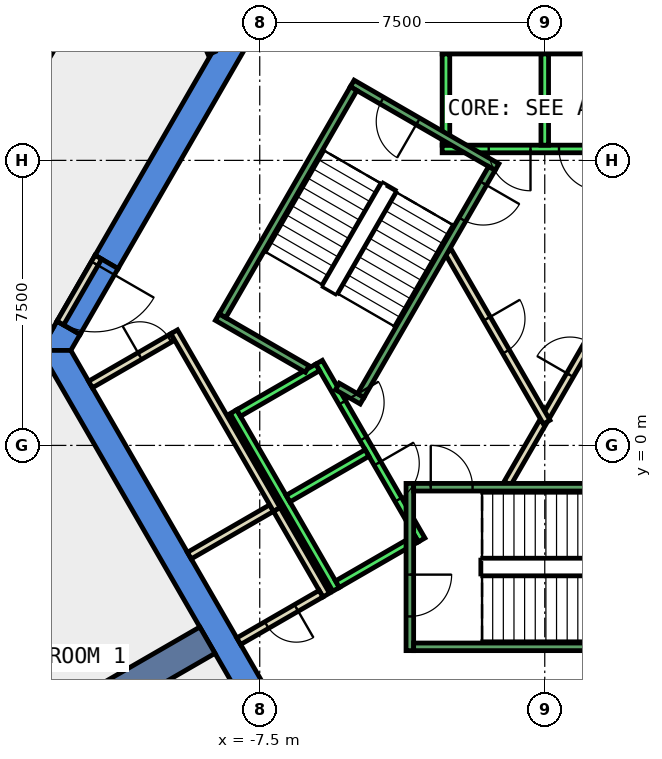
"""IFC4 building model, lengths in metres.
Left out: names, types, materials, properties, quantities, classifications, styles, units other than length and angle.
Written with IfcOpenShell. Run it as: python <this file> out.ifc"""

import sys

from ifc_helpers import new_model, si_unit, direction, frame, frame_2d, origin, place, context, subcontext, project, spatial, polyline, rectangle, outline, extrude, element, fill, save


model = new_model("IFC4")
c1 = context("Model", 3, precision=1e-05, world=origin(), true_north=direction((0.0, 1.0)))
c2 = subcontext(c1, "Body", "Model", "MODEL_VIEW")
j1 = project(units=[si_unit("LENGTHUNIT", "METRE"), si_unit("PLANEANGLEUNIT", "RADIAN")], contexts=[c1])
p1 = place(None, origin())
s1 = spatial("IfcSite", under=j1, at=p1, CompositionType="ELEMENT")
p2 = place(p1, origin())
s2 = spatial("IfcBuilding", under=s1, at=p2, CompositionType="ELEMENT")
p3 = place(p2, frame((0.0, 0.0, 223.4)))
s3 = spatial("IfcBuildingStorey", under=s2, at=p3, CompositionType="ELEMENT", Elevation=223.4)
p4 = place(p3, frame((0.0, 0.0, -0.4)))
e1 = element("IfcWall", 1, at=p4, inside=s3, PredefinedType="SHEAR", context=c2, shape_type="SweptSolid", body=[
    extrude(outline(polyline([(-11.834, 5.002), (-11.228, 4.652), (-6.235, 13.3), (-6.64, 14.0), (-11.834, 5.002)])), origin(), (0.0, 0.0, 1.0), 4.2),
])
p5 = place(p3, frame((0.0, 0.0, -0.4)))
e2 = element("IfcWall", 2, at=p5, inside=s3, PredefinedType="SHEAR", context=c2, shape_type="SweptSolid", body=[
    extrude(outline(polyline([(-12.228, 2.92), (-12.834, 3.27), (-13.279, 2.5), (-12.471, 2.5), (-12.228, 2.92)])), origin(), (0.0, 0.0, 1.0), 4.2),
])
p6 = place(p3, frame((0.0, 0.0, 3.6)))
e3 = element("IfcWall", 3, at=p6, inside=s3, PredefinedType="SHEAR", context=c2, shape_type="SweptSolid", body=[
    extrude(outline(polyline([(-12.834, 3.27), (-12.228, 2.92), (-11.228, 4.652), (-11.834, 5.002), (-12.834, 3.27)])), origin(), (0.0, 0.0, 1.0), 0.2),
])
p7 = place(p3, frame((0.0, 0.0, -0.4)))
e4 = element("IfcWall", 4, at=p7, inside=s3, PredefinedType="SHEAR", context=c2, shape_type="SweptSolid", body=[
    extrude(outline(polyline([(-13.279, 2.5), (-6.64, -9.0), (-6.235, -8.3), (-12.471, 2.5), (-13.279, 2.5)])), origin(), (0.0, 0.0, 1.0), 4.2),
])
p8 = place(p3, frame((-8.877, -5.125, -0.4), z_axis=(0.0, 0.0, 1.0), x_axis=(-0.866017533419, -0.500013631625, 0.0)))
e5 = element("IfcWall", 5, at=p8, inside=s3, PredefinedType="SHEAR", context=c2, shape_type="SweptSolid", body=[
    extrude(rectangle(XDim=9.0, YDim=0.8, at=frame_2d((4.5, 0.0))), origin(), (0.0, 0.0, 1.0), 4.2),
])
p9 = place(p3, frame((-9.624, 12.265, 0.0), z_axis=(0.0, 0.0, 1.0), x_axis=(0.404081180606, -0.914723127225, 0.0)))
e6 = element("IfcWall", 6, at=p9, inside=s3, PredefinedType="PARTITIONING", context=c2, shape_type="SweptSolid", body=[
    extrude(rectangle(XDim=2.126, YDim=0.2, at=frame_2d((1.063, 0.0))), origin(), (0.0, 0.0, 1.0), 3.8),
])
p10 = place(p3, frame((-12.984, 3.01, 0.0), z_axis=(0.0, 0.0, 1.0), x_axis=(-0.866046247233, 0.49996389635, 0.0)))
e7 = element("IfcWall", 7, at=p10, inside=s3, PredefinedType="PARTITIONING", context=c2, shape_type="SweptSolid", body=[
    extrude(rectangle(XDim=0.35, YDim=0.2, at=frame_2d((0.175, 0.0))), origin(), (0.0, 0.0, 1.0), 2.4),
])
p11 = place(p3, frame((-14.236, 8.305, 0.0), z_axis=(0.0, 0.0, 1.0), x_axis=(0.500110539333, 0.865961574464, 0.0)))
e8 = element("IfcWall", 8, at=p11, inside=s3, PredefinedType="PARTITIONING", context=c2, shape_type="SweptSolid", body=[
    extrude(rectangle(XDim=3.993, YDim=0.2, at=frame_2d((1.997, 0.0))), origin(), (0.0, 0.0, 1.0), 3.8),
])
p12 = place(p3, frame((-7.188, -1.65, 0.0), z_axis=(0.0, 0.0, 1.0), x_axis=(-0.866022959057, -0.500004234368, 0.0)))
e9 = element("IfcWall", 9, at=p12, inside=s3, PredefinedType="PARTITIONING", context=c2, shape_type="SweptSolid", body=[
    extrude(rectangle(XDim=2.5, YDim=0.2, at=frame_2d((1.25, 0.0))), origin(), (0.0, 0.0, 1.0), 3.8),
])
p13 = place(p3, frame((-11.953, 1.603, 0.0), z_axis=(0.0, 0.0, 1.0), x_axis=(0.865998541277, 0.500046524342, 0.0)))
e10 = element("IfcWall", 10, at=p13, inside=s3, PredefinedType="PARTITIONING", context=c2, shape_type="SweptSolid", body=[
    extrude(rectangle(XDim=2.5, YDim=0.2, at=frame_2d((1.25, 0.0))), origin(), (0.0, 0.0, 1.0), 3.8),
])
p14 = place(p13, frame((1.5, 0.0, 0.0)))
e11 = element("IfcOpeningElement", 11, at=p14, cuts=e10, PredefinedType="OPENING", context=c2, shape_type="SweptSolid", body=[
    extrude(rectangle(XDim=0.9, YDim=2.1, at=frame_2d((0.45, 1.05))), frame((0.0, 0.11, 0.0), z_axis=(0.0, -1.0, 0.0), x_axis=(1.0, 0.0, 0.0)), (0.0, 0.0, 1.0), 0.22),
])
p15 = place(p3, frame((-9.751, 2.99, 0.0), z_axis=(0.0, 0.0, 1.0), x_axis=(0.499955951776, -0.866050833545, 0.0)))
e12 = element("IfcWall", 12, at=p15, inside=s3, PredefinedType="PARTITIONING", context=c2, shape_type="SweptSolid", body=[
    extrude(rectangle(XDim=5.4, YDim=0.2, at=frame_2d((2.7, 0.0))), origin(), (0.0, 0.0, 1.0), 3.8),
])
p16 = place(p3, frame((-7.051, -1.687, 0.0), z_axis=(0.0, 0.0, 1.0), x_axis=(0.500128937424, -0.865950948929, 0.0)))
e13 = element("IfcWall", 13, at=p16, inside=s3, PredefinedType="PARTITIONING", context=c2, shape_type="SweptSolid", body=[
    extrude(rectangle(XDim=2.599, YDim=0.2, at=frame_2d((1.3, 0.0))), origin(), (0.0, 0.0, 1.0), 3.8),
])
p17 = place(p3, frame((-5.888, -3.902, 0.0), z_axis=(0.0, 0.0, 1.0), x_axis=(-0.866022959057, -0.500004234368, 0.0)))
e14 = element("IfcWall", 14, at=p17, inside=s3, PredefinedType="PARTITIONING", context=c2, shape_type="SweptSolid", body=[
    extrude(rectangle(XDim=2.5, YDim=0.2, at=frame_2d((1.25, 0.0))), origin(), (0.0, 0.0, 1.0), 3.8),
])
p18 = place(p17, frame((0.75, 0.0, 0.0)))
e15 = element("IfcOpeningElement", 15, at=p18, cuts=e14, PredefinedType="OPENING", context=c2, shape_type="SweptSolid", body=[
    extrude(rectangle(XDim=0.9, YDim=2.1, at=frame_2d((0.45, 1.05))), frame((0.0, 0.11, 0.0), z_axis=(0.0, -1.0, 0.0), x_axis=(1.0, 0.0, 0.0)), (0.0, 0.0, 1.0), 0.22),
])
p19 = place(p3, frame((-0.982, -1.0, 0.0), z_axis=(0.0, 0.0, 1.0), x_axis=(0.50024047865, 0.865886518847, 0.0)))
e16 = element("IfcWall", 16, at=p19, inside=s3, PredefinedType="PARTITIONING", context=c2, shape_type="SweptSolid", body=[
    extrude(rectangle(XDim=1.863, YDim=0.2, at=frame_2d((0.931, 0.0))), origin(), (0.0, 0.0, 1.0), 3.8),
])
p20 = place(p3, frame((0.05, 0.787, 0.0), z_axis=(0.0, 0.0, 1.0), x_axis=(0.499954076797, 0.866051915934, 0.0)))
e17 = element("IfcWall", 17, at=p20, inside=s3, PredefinedType="PARTITIONING", context=c2, shape_type="SweptSolid", body=[
    extrude(rectangle(XDim=3.558, YDim=0.2, at=frame_2d((1.779, 0.0))), origin(), (0.0, 0.0, 1.0), 3.8),
])
p21 = place(p20, frame((1.229, 0.0, 0.0)))
e18 = element("IfcOpeningElement", 18, at=p21, cuts=e17, PredefinedType="OPENING", context=c2, shape_type="SweptSolid", body=[
    extrude(rectangle(XDim=1.0, YDim=2.1, at=frame_2d((0.5, 1.05))), frame((0.0, 0.11, 0.0), z_axis=(0.0, -1.0, 0.0), x_axis=(1.0, 0.0, 0.0)), (0.0, 0.0, 1.0), 0.22),
])
p22 = place(p3, frame((-2.54, 5.1, 0.0), z_axis=(0.0, 0.0, 1.0), x_axis=(0.499925051871, -0.866068670783, 0.0)))
e19 = element("IfcWall", 19, at=p22, inside=s3, PredefinedType="PARTITIONING", context=c2, shape_type="SweptSolid", body=[
    extrude(rectangle(XDim=5.181, YDim=0.2, at=frame_2d((2.59, 0.0))), origin(), (0.0, 0.0, 1.0), 3.8),
])
p23 = place(p22, frame((2.04, 0.0, 0.0)))
e20 = element("IfcOpeningElement", 20, at=p23, cuts=e19, PredefinedType="OPENING", context=c2, shape_type="SweptSolid", body=[
    extrude(rectangle(XDim=1.0, YDim=2.1, at=frame_2d((0.5, 1.05))), frame((0.0, 0.11, 0.0), z_axis=(0.0, -1.0, 0.0), x_axis=(1.0, 0.0, 0.0)), (0.0, 0.0, 1.0), 0.22),
])
p24 = place(p3, frame((-11.747, 4.952, 0.0), z_axis=(0.0, 0.0, 1.0), x_axis=(-0.50002537861, -0.866010750942, 0.0)))
e21 = element("IfcWall", 21, at=p24, inside=s3, PredefinedType="PARTITIONING", context=c2, shape_type="SweptSolid", body=[
    extrude(rectangle(XDim=2.0, YDim=0.2, at=frame_2d((1.0, 0.0))), origin(), (0.0, 0.0, 1.0), 2.4),
])
p25 = place(p24, frame((0.19, 0.0, 0.0)))
e22 = element("IfcOpeningElement", 22, at=p25, cuts=e21, PredefinedType="OPENING", context=c2, shape_type="SweptSolid", body=[
    extrude(rectangle(XDim=1.8, YDim=2.1, at=frame_2d((0.9, 1.05))), frame((0.0, 0.11, 0.0), z_axis=(0.0, -1.0, 0.0), x_axis=(1.0, 0.0, 0.0)), (0.0, 0.0, 1.0), 0.22),
])
p26 = place(p3, frame((2.7, 7.8, 0.0), z_axis=(0.0, 0.0, 1.0), x_axis=(-1.0, 0.0, 0.0)))
e23 = element("IfcWall", 23, at=p26, inside=s3, PredefinedType="STANDARD", context=c2, shape_type="SweptSolid", body=[
    extrude(rectangle(XDim=5.4, YDim=0.2, at=frame_2d((2.7, 0.0))), origin(), (0.0, 0.0, 1.0), 3.8),
])
p27 = place(p26, frame((1.225, 0.0, 0.0)))
e24 = element("IfcOpeningElement", 24, at=p27, cuts=e23, PredefinedType="OPENING", context=c2, shape_type="SweptSolid", body=[
    extrude(rectangle(XDim=1.1, YDim=2.1, at=frame_2d((0.55, 1.05))), frame((0.0, 0.11, 0.0), z_axis=(0.0, -1.0, 0.0), x_axis=(1.0, 0.0, 0.0)), (0.0, 0.0, 1.0), 0.22),
])
p28 = place(p26, frame((3.075, 0.0, 0.0)))
e25 = element("IfcOpeningElement", 25, at=p28, cuts=e23, PredefinedType="OPENING", context=c2, shape_type="SweptSolid", body=[
    extrude(rectangle(XDim=1.1, YDim=2.1, at=frame_2d((0.55, 1.05))), frame((0.0, 0.11, 0.0), z_axis=(0.0, -1.0, 0.0), x_axis=(1.0, 0.0, 0.0)), (0.0, 0.0, 1.0), 0.22),
])
p29 = place(p3, frame((2.7, 10.4, 0.0), z_axis=(0.0, 0.0, 1.0), x_axis=(-1.0, 0.0, 0.0)))
e26 = element("IfcWall", 26, at=p29, inside=s3, PredefinedType="STANDARD", context=c2, shape_type="SweptSolid", body=[
    extrude(rectangle(XDim=5.4, YDim=0.2, at=frame_2d((2.7, 0.0))), origin(), (0.0, 0.0, 1.0), 3.8),
])
for number, where, z_axis, x_axis in (
    (27, (0.0, 7.9, 0.0), (0.0, 0.0, 1.0), (0.0, 1.0, 0.0)),
    (28, (-2.6, 7.9, 0.0), (0.0, 0.0, 1.0), (0.0, 1.0, 0.0)),
):
    element("IfcWall", number, at=place(p3, frame(where, z_axis=z_axis, x_axis=x_axis)), inside=s3, PredefinedType="STANDARD", context=c2, shape_type="SweptSolid", body=[
        extrude(rectangle(XDim=2.4, YDim=0.2, at=frame_2d((1.2, 0.0))), origin(), (0.0, 0.0, 1.0), 3.8),
    ])
p30 = place(p3, frame((-5.94, 2.188, 0.0), z_axis=(0.0, 0.0, 1.0), x_axis=(0.500034260056, -0.866005622828, 0.0)))
e29 = element("IfcWall", 29, at=p30, inside=s3, PredefinedType="STANDARD", context=c2, shape_type="SweptSolid", body=[
    extrude(rectangle(XDim=5.399, YDim=0.2, at=frame_2d((2.7, 0.0))), origin(), (0.0, 0.0, 1.0), 3.8),
])
p31 = place(p30, frame((3.075, 0.0, 0.0)))
e30 = element("IfcOpeningElement", 30, at=p31, cuts=e29, PredefinedType="OPENING", context=c2, shape_type="SweptSolid", body=[
    extrude(rectangle(XDim=1.1, YDim=2.1, at=frame_2d((0.55, 1.05))), frame((0.0, 0.11, 0.0), z_axis=(0.0, -1.0, 0.0), x_axis=(1.0, 0.0, 0.0)), (0.0, 0.0, 1.0), 0.22),
])
p32 = place(p30, frame((1.225, 0.0, 0.0)))
e31 = element("IfcOpeningElement", 31, at=p32, cuts=e29, PredefinedType="OPENING", context=c2, shape_type="SweptSolid", body=[
    extrude(rectangle(XDim=1.1, YDim=2.1, at=frame_2d((0.55, 1.05))), frame((0.0, 0.11, 0.0), z_axis=(0.0, -1.0, 0.0), x_axis=(1.0, 0.0, 0.0)), (0.0, 0.0, 1.0), 0.22),
])
p33 = place(p3, frame((-8.192, 0.888, 0.0), z_axis=(0.0, 0.0, 1.0), x_axis=(0.500034260056, -0.866005622828, 0.0)))
e32 = element("IfcWall", 32, at=p33, inside=s3, PredefinedType="STANDARD", context=c2, shape_type="SweptSolid", body=[
    extrude(rectangle(XDim=5.399, YDim=0.2, at=frame_2d((2.7, 0.0))), origin(), (0.0, 0.0, 1.0), 3.8),
])
for number, where, z_axis, x_axis in (
    (33, (-5.977, 2.052, 0.0), (0.0, 0.0, 1.0), (-0.866, -0.5, 0.0)),
    (34, (-4.677, -0.2, 0.0), (0.0, 0.0, 1.0), (-0.866, -0.5, 0.0)),
):
    element("IfcWall", number, at=place(p3, frame(where, z_axis=z_axis, x_axis=x_axis)), inside=s3, PredefinedType="STANDARD", context=c2, shape_type="SweptSolid", body=[
        extrude(rectangle(XDim=2.399, YDim=0.2, at=frame_2d((1.2, 0.0))), origin(), (0.0, 0.0, 1.0), 3.8),
    ])
p34 = place(p3, frame((-3.377, -2.452, 0.0), z_axis=(0.0, 0.0, 1.0), x_axis=(-0.865955154139, -0.50012165622, 0.0)))
e35 = element("IfcWall", 35, at=p34, inside=s3, PredefinedType="STANDARD", context=c2, shape_type="SweptSolid", body=[
    extrude(rectangle(XDim=2.4, YDim=0.2, at=frame_2d((1.2, 0.0))), origin(), (0.0, 0.0, 1.0), 3.8),
])
p35 = place(p3, frame((-3.55, -1.0, 0.0), z_axis=(0.0, 0.0, 1.0), x_axis=(0.0, -1.0, 0.0)))
e36 = element("IfcWall", 36, at=p35, inside=s3, PredefinedType="STANDARD", context=c2, shape_type="SweptSolid", body=[
    extrude(rectangle(XDim=4.4, YDim=0.2, at=frame_2d((2.2, 0.0))), origin(), (0.0, 0.0, 1.0), 3.8),
])
p36 = place(p35, frame((2.4, 0.0, 0.0)))
e37 = element("IfcOpeningElement", 37, at=p36, cuts=e36, PredefinedType="OPENING", context=c2, shape_type="SweptSolid", body=[
    extrude(rectangle(XDim=1.1, YDim=2.2, at=frame_2d((0.55, 1.1))), frame((0.0, 0.11, 0.0), z_axis=(0.0, -1.0, 0.0), x_axis=(1.0, 0.0, 0.0)), (0.0, 0.0, 1.0), 0.22),
])
p37 = place(p3, frame((-3.45, -1.1, 0.0), z_axis=(0.0, 0.0, 1.0), x_axis=(1.0, 0.0, 0.0)))
e38 = element("IfcWall", 38, at=p37, inside=s3, PredefinedType="STANDARD", context=c2, shape_type="SweptSolid", body=[
    extrude(rectangle(XDim=6.9, YDim=0.2, at=frame_2d((3.45, 0.0))), origin(), (0.0, 0.0, 1.0), 3.8),
])
p38 = place(p37, frame((0.45, 0.0, 0.0)))
e39 = element("IfcOpeningElement", 39, at=p38, cuts=e38, PredefinedType="OPENING", context=c2, shape_type="SweptSolid", body=[
    extrude(rectangle(XDim=1.1, YDim=2.2, at=frame_2d((0.55, 1.1))), frame((0.0, 0.11, 0.0), z_axis=(0.0, -1.0, 0.0), x_axis=(1.0, 0.0, 0.0)), (0.0, 0.0, 1.0), 0.22),
])
p39 = place(p3, frame((-3.45, -5.3, 0.0), z_axis=(0.0, 0.0, 1.0), x_axis=(1.0, 0.0, 0.0)))
e40 = element("IfcWall", 40, at=p39, inside=s3, PredefinedType="STANDARD", context=c2, shape_type="SweptSolid", body=[
    extrude(rectangle(XDim=6.9, YDim=0.2, at=frame_2d((3.45, 0.0))), origin(), (0.0, 0.0, 1.0), 3.8),
])
p40 = place(p3, frame((-1.256, 7.324, 0.0), z_axis=(0.0, 0.0, 1.0), x_axis=(-0.866046073146, 0.499964197906, 0.0)))
e41 = element("IfcWall", 41, at=p40, inside=s3, PredefinedType="STANDARD", context=c2, shape_type="SweptSolid", body=[
    extrude(rectangle(XDim=4.4, YDim=0.2, at=frame_2d((2.2, 0.0))), origin(), (0.0, 0.0, 1.0), 3.8),
])
p41 = place(p40, frame((2.4, 0.0, 0.0)))
e42 = element("IfcOpeningElement", 42, at=p41, cuts=e41, PredefinedType="OPENING", context=c2, shape_type="SweptSolid", body=[
    extrude(rectangle(XDim=1.1, YDim=2.2, at=frame_2d((0.55, 1.1))), frame((0.0, 0.11, 0.0), z_axis=(0.0, -1.0, 0.0), x_axis=(1.0, 0.0, 0.0)), (0.0, 0.0, 1.0), 0.22),
])
p42 = place(p3, frame((-6.25, 2.01, 0.0), z_axis=(0.0, 0.0, 1.0), x_axis=(-0.86611865017, 0.499838457731, 0.0)))
e43 = element("IfcWall", 43, at=p42, inside=s3, PredefinedType="STANDARD", context=c2, shape_type="SweptSolid", body=[
    extrude(rectangle(XDim=2.733, YDim=0.2, at=frame_2d((1.366, 0.0))), origin(), (0.0, 0.0, 1.0), 3.8),
])
p43 = place(p3, frame((-4.806, 1.176, 0.0), z_axis=(0.0, 0.0, 1.0), x_axis=(-0.866558586415, 0.499075361355, 0.0)))
e44 = element("IfcWall", 44, at=p43, inside=s3, PredefinedType="STANDARD", context=c2, shape_type="SweptSolid", body=[
    extrude(rectangle(XDim=0.751, YDim=0.2, at=frame_2d((0.376, 0.0))), origin(), (0.0, 0.0, 1.0), 3.8),
])
p44 = place(p3, frame((-1.393, 7.288, 0.0), z_axis=(0.0, 0.0, 1.0), x_axis=(-0.499963383562, -0.866046543262, 0.0)))
e45 = element("IfcWall", 45, at=p44, inside=s3, PredefinedType="STANDARD", context=c2, shape_type="SweptSolid", body=[
    extrude(rectangle(XDim=6.9, YDim=0.2, at=frame_2d((3.45, 0.0))), origin(), (0.0, 0.0, 1.0), 3.8),
])
p45 = place(p44, frame((0.45, 0.0, 0.0)))
e46 = element("IfcOpeningElement", 46, at=p45, cuts=e45, PredefinedType="OPENING", context=c2, shape_type="SweptSolid", body=[
    extrude(rectangle(XDim=1.1, YDim=2.2, at=frame_2d((0.55, 1.1))), frame((0.0, 0.11, 0.0), z_axis=(0.0, -1.0, 0.0), x_axis=(1.0, 0.0, 0.0)), (0.0, 0.0, 1.0), 0.22),
])
p46 = place(p3, frame((-5.03, 9.388, 0.0), z_axis=(0.0, 0.0, 1.0), x_axis=(-0.499978703459, -0.866037698999, 0.0)))
e47 = element("IfcWall", 47, at=p46, inside=s3, PredefinedType="STANDARD", context=c2, shape_type="SweptSolid", body=[
    extrude(rectangle(XDim=6.9, YDim=0.2, at=frame_2d((3.45, 0.0))), origin(), (0.0, 0.0, 1.0), 3.8),
])
p47 = place(p21, origin())
e48 = element("IfcDoor", 48, at=p47, inside=s3, OperationType="SINGLE_SWING_RIGHT", PredefinedType="DOOR", context=c2, shape_type="SweptSolid", body=[
    extrude(rectangle(XDim=1.0, YDim=2.1, at=frame_2d((0.5, 1.05))), frame((0.0, 0.025, 0.0), z_axis=(0.0, -1.0, 0.0), x_axis=(1.0, 0.0, 0.0)), (0.0, 0.0, 1.0), 0.05),
])
fill(e18, e48)
p48 = place(p23, origin())
e49 = element("IfcDoor", 49, at=p48, inside=s3, OperationType="SINGLE_SWING_RIGHT", PredefinedType="DOOR", context=c2, shape_type="SweptSolid", body=[
    extrude(rectangle(XDim=1.0, YDim=2.1, at=frame_2d((0.5, 1.05))), frame((0.0, 0.025, 0.0), z_axis=(0.0, -1.0, 0.0), x_axis=(1.0, 0.0, 0.0)), (0.0, 0.0, 1.0), 0.05),
])
fill(e20, e49)
p49 = place(p14, origin())
e50 = element("IfcDoor", 50, at=p49, inside=s3, OperationType="SINGLE_SWING_LEFT", PredefinedType="DOOR", context=c2, shape_type="SweptSolid", body=[
    extrude(rectangle(XDim=0.9, YDim=2.1, at=frame_2d((0.45, 1.05))), frame((0.0, 0.025, 0.0), z_axis=(0.0, -1.0, 0.0), x_axis=(1.0, 0.0, 0.0)), (0.0, 0.0, 1.0), 0.05),
])
fill(e11, e50)
p50 = place(p18, origin())
e51 = element("IfcDoor", 51, at=p50, inside=s3, OperationType="SINGLE_SWING_RIGHT", PredefinedType="DOOR", context=c2, shape_type="SweptSolid", body=[
    extrude(rectangle(XDim=0.9, YDim=2.1, at=frame_2d((0.45, 1.05))), frame((0.0, 0.025, 0.0), z_axis=(0.0, -1.0, 0.0), x_axis=(1.0, 0.0, 0.0)), (0.0, 0.0, 1.0), 0.05),
])
fill(e15, e51)
p51 = place(p25, origin())
e52 = element("IfcDoor", 52, at=p51, inside=s3, OperationType="DOUBLE_DOOR_SINGLE_SWING", PredefinedType="DOOR", context=c2, shape_type="SweptSolid", body=[
    extrude(rectangle(XDim=1.8, YDim=2.1, at=frame_2d((0.9, 1.05))), frame((0.0, 0.025, 0.0), z_axis=(0.0, -1.0, 0.0), x_axis=(1.0, 0.0, 0.0)), (0.0, 0.0, 1.0), 0.05),
])
fill(e22, e52)
p52 = place(p27, origin())
e53 = element("IfcDoor", 53, at=p52, inside=s3, OperationType="SLIDING_TO_LEFT", PredefinedType="DOOR", context=c2, shape_type="SweptSolid", body=[
    extrude(rectangle(XDim=1.1, YDim=2.1, at=frame_2d((0.55, 1.05))), frame((0.0, 0.025, 0.0), z_axis=(0.0, -1.0, 0.0), x_axis=(1.0, 0.0, 0.0)), (0.0, 0.0, 1.0), 0.05),
])
fill(e24, e53)
p53 = place(p28, origin())
e54 = element("IfcDoor", 54, at=p53, inside=s3, OperationType="SLIDING_TO_LEFT", PredefinedType="DOOR", context=c2, shape_type="SweptSolid", body=[
    extrude(rectangle(XDim=1.1, YDim=2.1, at=frame_2d((0.55, 1.05))), frame((0.0, 0.025, 0.0), z_axis=(0.0, -1.0, 0.0), x_axis=(1.0, 0.0, 0.0)), (0.0, 0.0, 1.0), 0.05),
])
fill(e25, e54)
p54 = place(p31, origin())
e55 = element("IfcDoor", 55, at=p54, inside=s3, OperationType="SLIDING_TO_LEFT", PredefinedType="DOOR", context=c2, shape_type="SweptSolid", body=[
    extrude(rectangle(XDim=1.1, YDim=2.1, at=frame_2d((0.55, 1.05))), frame((0.0, 0.025, 0.0), z_axis=(0.0, -1.0, 0.0), x_axis=(1.0, 0.0, 0.0)), (0.0, 0.0, 1.0), 0.05),
])
fill(e30, e55)
p55 = place(p32, origin())
e56 = element("IfcDoor", 56, at=p55, inside=s3, OperationType="SLIDING_TO_LEFT", PredefinedType="DOOR", context=c2, shape_type="SweptSolid", body=[
    extrude(rectangle(XDim=1.1, YDim=2.1, at=frame_2d((0.55, 1.05))), frame((0.0, 0.025, 0.0), z_axis=(0.0, -1.0, 0.0), x_axis=(1.0, 0.0, 0.0)), (0.0, 0.0, 1.0), 0.05),
])
fill(e31, e56)
p56 = place(p38, origin())
e57 = element("IfcDoor", 57, at=p56, inside=s3, OperationType="SINGLE_SWING_LEFT", PredefinedType="DOOR", context=c2, shape_type="SweptSolid", body=[
    extrude(rectangle(XDim=1.1, YDim=2.2, at=frame_2d((0.55, 1.1))), frame((0.0, 0.025, 0.0), z_axis=(0.0, -1.0, 0.0), x_axis=(1.0, 0.0, 0.0)), (0.0, 0.0, 1.0), 0.05),
])
fill(e39, e57)
p57 = place(p36, origin())
e58 = element("IfcDoor", 58, at=p57, inside=s3, OperationType="SINGLE_SWING_LEFT", PredefinedType="DOOR", context=c2, shape_type="SweptSolid", body=[
    extrude(rectangle(XDim=1.1, YDim=2.2, at=frame_2d((0.55, 1.1))), frame((0.0, 0.025, 0.0), z_axis=(0.0, -1.0, 0.0), x_axis=(1.0, 0.0, 0.0)), (0.0, 0.0, 1.0), 0.05),
])
fill(e37, e58)
p58 = place(p45, origin())
e59 = element("IfcDoor", 59, at=p58, inside=s3, OperationType="SINGLE_SWING_LEFT", PredefinedType="DOOR", context=c2, shape_type="SweptSolid", body=[
    extrude(rectangle(XDim=1.1, YDim=2.2, at=frame_2d((0.55, 1.1))), frame((0.0, 0.025, 0.0), z_axis=(0.0, -1.0, 0.0), x_axis=(1.0, 0.0, 0.0)), (0.0, 0.0, 1.0), 0.05),
])
fill(e46, e59)
p59 = place(p41, origin())
e60 = element("IfcDoor", 60, at=p59, inside=s3, OperationType="SINGLE_SWING_LEFT", PredefinedType="DOOR", context=c2, shape_type="SweptSolid", body=[
    extrude(rectangle(XDim=1.1, YDim=2.2, at=frame_2d((0.55, 1.1))), frame((0.0, 0.025, 0.0), z_axis=(0.0, -1.0, 0.0), x_axis=(1.0, 0.0, 0.0)), (0.0, 0.0, 1.0), 0.05),
])
fill(e42, e60)
save(model, sys.argv[1])
